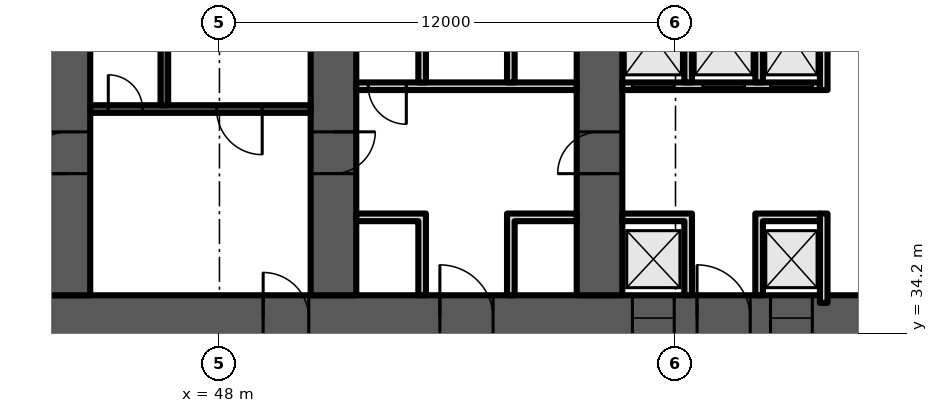
"""IFC4 building model, lengths in metres.
Left out: names, types, materials, properties, quantities, classifications, styles, units other than length and angle.
Written with IfcOpenShell. Run it as: python <this file> out.ifc"""

import sys

from ifc_helpers import new_model, si_unit, direction, frame, frame_2d, origin, place, context, subcontext, project, spatial, polyline, rectangle, outline, extrude, element, fill, save


model = new_model("IFC4")
c1 = context("Model", 3, precision=1e-05, world=origin(), true_north=direction((0.0, 1.0)))
c2 = subcontext(c1, "Body", "Model", "MODEL_VIEW")
j1 = project(units=[si_unit("LENGTHUNIT", "METRE"), si_unit("PLANEANGLEUNIT", "RADIAN")], contexts=[c1])
p1 = place(None, origin())
s1 = spatial("IfcSite", under=j1, at=p1, CompositionType="ELEMENT")
p2 = place(p1, origin())
s2 = spatial("IfcBuilding", under=s1, at=p2, CompositionType="ELEMENT")
p3 = place(p2, frame((0.0, 0.0, 8.0)))
s3 = spatial("IfcBuildingStorey", under=s2, at=p3, CompositionType="ELEMENT", Elevation=8.0)
p4 = place(p3, frame((9.0, 34.6, 0.0), z_axis=(0.0, 0.0, 1.0), x_axis=(1.0, 0.0, 0.0)))
e1 = element("IfcWall", 1, at=p4, inside=s3, PredefinedType="SHEAR", context=c2, shape_type="SweptSolid", body=[
    extrude(rectangle(XDim=56.0, YDim=1.2, at=frame_2d((28.0, 0.0))), origin(), (0.0, 0.0, 1.0), 6.7),
])
p5 = place(p4, frame((2.0, 0.0, 0.0)))
e2 = element("IfcOpeningElement", 2, at=p5, cuts=e1, PredefinedType="OPENING", context=c2, shape_type="SweptSolid", body=[
    extrude(rectangle(XDim=1.0, YDim=2.1, at=frame_2d((0.5, 1.05))), frame((0.0, 0.61, 0.0), z_axis=(0.0, -1.0, 0.0), x_axis=(1.0, 0.0, 0.0)), (0.0, 0.0, 1.0), 1.22),
])
p6 = place(p4, frame((4.6, 0.0, 0.0)))
e3 = element("IfcOpeningElement", 3, at=p6, cuts=e1, PredefinedType="OPENING", context=c2, shape_type="SweptSolid", body=[
    extrude(rectangle(XDim=1.0, YDim=2.1, at=frame_2d((0.5, 1.05))), frame((0.0, 0.61, 0.0), z_axis=(0.0, -1.0, 0.0), x_axis=(1.0, 0.0, 0.0)), (0.0, 0.0, 1.0), 1.22),
])
p7 = place(p4, frame((7.867, 0.0, 0.0)))
e4 = element("IfcOpeningElement", 4, at=p7, cuts=e1, PredefinedType="OPENING", context=c2, shape_type="SweptSolid", body=[
    extrude(rectangle(XDim=1.1, YDim=2.1, at=frame_2d((0.55, 1.05))), frame((0.0, 0.61, 0.0), z_axis=(0.0, -1.0, 0.0), x_axis=(1.0, 0.0, 0.0)), (0.0, 0.0, 1.0), 1.22),
])
p8 = place(p4, frame((12.033, 0.0, 0.0)))
e5 = element("IfcOpeningElement", 5, at=p8, cuts=e1, PredefinedType="OPENING", context=c2, shape_type="SweptSolid", body=[
    extrude(rectangle(XDim=1.1, YDim=2.1, at=frame_2d((0.55, 1.05))), frame((0.0, 0.61, 0.0), z_axis=(0.0, -1.0, 0.0), x_axis=(1.0, 0.0, 0.0)), (0.0, 0.0, 1.0), 1.22),
])
p9 = place(p4, frame((9.8, 0.0, 0.0)))
e6 = element("IfcOpeningElement", 6, at=p9, cuts=e1, PredefinedType="OPENING", context=c2, shape_type="SweptSolid", body=[
    extrude(rectangle(XDim=1.4, YDim=2.1, at=frame_2d((0.7, 1.05))), frame((0.0, 0.61, 0.0), z_axis=(0.0, -1.0, 0.0), x_axis=(1.0, 0.0, 0.0)), (0.0, 0.0, 1.0), 1.22),
])
p10 = place(p4, frame((14.65, 0.0, 0.0)))
e7 = element("IfcOpeningElement", 7, at=p10, cuts=e1, PredefinedType="OPENING", context=c2, shape_type="SweptSolid", body=[
    extrude(rectangle(XDim=1.2, YDim=2.1, at=frame_2d((0.6, 1.05))), frame((0.0, 0.61, 0.0), z_axis=(0.0, -1.0, 0.0), x_axis=(1.0, 0.0, 0.0)), (0.0, 0.0, 1.0), 1.22),
])
p11 = place(p4, frame((21.867, 0.0, 0.0)))
e8 = element("IfcOpeningElement", 8, at=p11, cuts=e1, PredefinedType="OPENING", context=c2, shape_type="SweptSolid", body=[
    extrude(rectangle(XDim=1.1, YDim=2.1, at=frame_2d((0.55, 1.05))), frame((0.0, 0.61, 0.0), z_axis=(0.0, -1.0, 0.0), x_axis=(1.0, 0.0, 0.0)), (0.0, 0.0, 1.0), 1.22),
])
p12 = place(p4, frame((26.033, 0.0, 0.0)))
e9 = element("IfcOpeningElement", 9, at=p12, cuts=e1, PredefinedType="OPENING", context=c2, shape_type="SweptSolid", body=[
    extrude(rectangle(XDim=1.1, YDim=2.1, at=frame_2d((0.55, 1.05))), frame((0.0, 0.61, 0.0), z_axis=(0.0, -1.0, 0.0), x_axis=(1.0, 0.0, 0.0)), (0.0, 0.0, 1.0), 1.22),
])
p13 = place(p4, frame((23.8, 0.0, 0.0)))
e10 = element("IfcOpeningElement", 10, at=p13, cuts=e1, PredefinedType="OPENING", context=c2, shape_type="SweptSolid", body=[
    extrude(rectangle(XDim=1.4, YDim=2.1, at=frame_2d((0.7, 1.05))), frame((0.0, 0.61, 0.0), z_axis=(0.0, -1.0, 0.0), x_axis=(1.0, 0.0, 0.0)), (0.0, 0.0, 1.0), 1.22),
])
p14 = place(p4, frame((28.867, 0.0, 0.0)))
e11 = element("IfcOpeningElement", 11, at=p14, cuts=e1, PredefinedType="OPENING", context=c2, shape_type="SweptSolid", body=[
    extrude(rectangle(XDim=1.1, YDim=2.1, at=frame_2d((0.55, 1.05))), frame((0.0, 0.61, 0.0), z_axis=(0.0, -1.0, 0.0), x_axis=(1.0, 0.0, 0.0)), (0.0, 0.0, 1.0), 1.22),
])
p15 = place(p4, frame((33.033, 0.0, 0.0)))
e12 = element("IfcOpeningElement", 12, at=p15, cuts=e1, PredefinedType="OPENING", context=c2, shape_type="SweptSolid", body=[
    extrude(rectangle(XDim=1.1, YDim=2.1, at=frame_2d((0.55, 1.05))), frame((0.0, 0.61, 0.0), z_axis=(0.0, -1.0, 0.0), x_axis=(1.0, 0.0, 0.0)), (0.0, 0.0, 1.0), 1.22),
])
p16 = place(p4, frame((40.15, 0.0, 0.0)))
e13 = element("IfcOpeningElement", 13, at=p16, cuts=e1, PredefinedType="OPENING", context=c2, shape_type="SweptSolid", body=[
    extrude(rectangle(XDim=1.2, YDim=2.1, at=frame_2d((0.6, 1.05))), frame((0.0, 0.61, 0.0), z_axis=(0.0, -1.0, 0.0), x_axis=(1.0, 0.0, 0.0)), (0.0, 0.0, 1.0), 1.22),
])
p17 = place(p4, frame((44.8, 0.0, 0.0)))
e14 = element("IfcOpeningElement", 14, at=p17, cuts=e1, PredefinedType="OPENING", context=c2, shape_type="SweptSolid", body=[
    extrude(rectangle(XDim=1.4, YDim=2.1, at=frame_2d((0.7, 1.05))), frame((0.0, 0.61, 0.0), z_axis=(0.0, -1.0, 0.0), x_axis=(1.0, 0.0, 0.0)), (0.0, 0.0, 1.0), 1.22),
])
p18 = place(p4, frame((49.867, 0.0, 0.0)))
e15 = element("IfcOpeningElement", 15, at=p18, cuts=e1, PredefinedType="OPENING", context=c2, shape_type="SweptSolid", body=[
    extrude(rectangle(XDim=1.1, YDim=2.1, at=frame_2d((0.55, 1.05))), frame((0.0, 0.61, 0.0), z_axis=(0.0, -1.0, 0.0), x_axis=(1.0, 0.0, 0.0)), (0.0, 0.0, 1.0), 1.22),
])
p19 = place(p4, frame((53.5, 0.0, 0.0)))
e16 = element("IfcOpeningElement", 16, at=p19, cuts=e1, PredefinedType="OPENING", context=c2, shape_type="SweptSolid", body=[
    extrude(rectangle(XDim=1.1, YDim=2.1, at=frame_2d((0.55, 1.05))), frame((0.0, 0.61, 0.0), z_axis=(0.0, -1.0, 0.0), x_axis=(1.0, 0.0, 0.0)), (0.0, 0.0, 1.0), 1.22),
])
p20 = place(p4, frame((51.567, 0.0, 0.0)))
e17 = element("IfcOpeningElement", 17, at=p20, cuts=e1, PredefinedType="OPENING", context=c2, shape_type="SweptSolid", body=[
    extrude(rectangle(XDim=1.4, YDim=2.1, at=frame_2d((0.7, 1.05))), frame((0.0, 0.61, 0.0), z_axis=(0.0, -1.0, 0.0), x_axis=(1.0, 0.0, 0.0)), (0.0, 0.0, 1.0), 1.22),
])
p21 = place(p3, frame((44.0, 35.2, 0.0), z_axis=(0.0, 0.0, 1.0), x_axis=(0.0, 1.0, 0.0)))
e18 = element("IfcWall", 18, at=p21, inside=s3, PredefinedType="SHEAR", context=c2, shape_type="SweptSolid", body=[
    extrude(rectangle(XDim=12.8, YDim=1.2, at=frame_2d((6.4, 0.0))), origin(), (0.0, 0.0, 1.0), 6.7),
])
p22 = place(p21, frame((3.2, 0.0, 0.0)))
e19 = element("IfcOpeningElement", 19, at=p22, cuts=e18, PredefinedType="OPENING", context=c2, shape_type="SweptSolid", body=[
    extrude(rectangle(XDim=1.1, YDim=2.1, at=frame_2d((0.55, 1.05))), frame((0.0, 0.61, 0.0), z_axis=(0.0, -1.0, 0.0), x_axis=(1.0, 0.0, 0.0)), (0.0, 0.0, 1.0), 1.22),
])
p23 = place(p21, frame((9.6, 0.0, 0.0)))
e20 = element("IfcOpeningElement", 20, at=p23, cuts=e18, PredefinedType="OPENING", context=c2, shape_type="SweptSolid", body=[
    extrude(rectangle(XDim=1.0, YDim=2.1, at=frame_2d((0.5, 1.05))), frame((0.0, 0.61, 0.0), z_axis=(0.0, -1.0, 0.0), x_axis=(1.0, 0.0, 0.0)), (0.0, 0.0, 1.0), 1.22),
])
p24 = place(p3, frame((51.0, 35.2, 0.0), z_axis=(0.0, 0.0, 1.0), x_axis=(0.0, 1.0, 0.0)))
e21 = element("IfcWall", 21, at=p24, inside=s3, PredefinedType="SHEAR", context=c2, shape_type="SweptSolid", body=[
    extrude(rectangle(XDim=12.8, YDim=1.2, at=frame_2d((6.4, 0.0))), origin(), (0.0, 0.0, 1.0), 6.7),
])
p25 = place(p24, frame((3.2, 0.0, 0.0)))
e22 = element("IfcOpeningElement", 22, at=p25, cuts=e21, PredefinedType="OPENING", context=c2, shape_type="SweptSolid", body=[
    extrude(rectangle(XDim=1.1, YDim=2.1, at=frame_2d((0.55, 1.05))), frame((0.0, 0.61, 0.0), z_axis=(0.0, -1.0, 0.0), x_axis=(1.0, 0.0, 0.0)), (0.0, 0.0, 1.0), 1.22),
])
p26 = place(p3, frame((58.0, 35.2, 0.0), z_axis=(0.0, 0.0, 1.0), x_axis=(0.0, 1.0, 0.0)))
e23 = element("IfcWall", 23, at=p26, inside=s3, PredefinedType="SHEAR", context=c2, shape_type="SweptSolid", body=[
    extrude(rectangle(XDim=12.8, YDim=1.2, at=frame_2d((6.4, 0.0))), origin(), (0.0, 0.0, 1.0), 6.7),
])
p27 = place(p26, frame((10.134, 0.0, 0.0)))
e24 = element("IfcOpeningElement", 24, at=p27, cuts=e23, PredefinedType="OPENING", context=c2, shape_type="SweptSolid", body=[
    extrude(rectangle(XDim=1.0, YDim=2.1, at=frame_2d((0.5, 1.05))), frame((0.0, 0.61, 0.0), z_axis=(0.0, -1.0, 0.0), x_axis=(1.0, 0.0, 0.0)), (0.0, 0.0, 1.0), 1.22),
])
p28 = place(p26, frame((3.2, 0.0, 0.0)))
e25 = element("IfcOpeningElement", 25, at=p28, cuts=e23, PredefinedType="OPENING", context=c2, shape_type="SweptSolid", body=[
    extrude(rectangle(XDim=1.1, YDim=2.1, at=frame_2d((0.55, 1.05))), frame((0.0, 0.61, 0.0), z_axis=(0.0, -1.0, 0.0), x_axis=(1.0, 0.0, 0.0)), (0.0, 0.0, 1.0), 1.22),
])
p29 = place(p3, frame((44.6, 40.1, 0.0), z_axis=(0.0, 0.0, 1.0), x_axis=(1.0, 0.0, 0.0)))
e26 = element("IfcWall", 26, at=p29, inside=s3, PredefinedType="SHEAR", context=c2, shape_type="SweptSolid", body=[
    extrude(rectangle(XDim=5.8, YDim=0.2, at=frame_2d((2.9, 0.0))), origin(), (0.0, 0.0, 1.0), 6.7),
])
p30 = place(p29, frame((3.325, 0.0, 0.0)))
e27 = element("IfcOpeningElement", 27, at=p30, cuts=e26, PredefinedType="OPENING", context=c2, shape_type="SweptSolid", body=[
    extrude(rectangle(XDim=1.2, YDim=2.1, at=frame_2d((0.6, 1.05))), frame((0.0, 0.11, 0.0), z_axis=(0.0, -1.0, 0.0), x_axis=(1.0, 0.0, 0.0)), (0.0, 0.0, 1.0), 0.22),
])
p31 = place(p29, frame((0.475, 0.0, 0.0)))
e28 = element("IfcOpeningElement", 28, at=p31, cuts=e26, PredefinedType="OPENING", context=c2, shape_type="SweptSolid", body=[
    extrude(rectangle(XDim=0.9, YDim=2.1, at=frame_2d((0.45, 1.05))), frame((0.0, 0.11, 0.0), z_axis=(0.0, -1.0, 0.0), x_axis=(1.0, 0.0, 0.0)), (0.0, 0.0, 1.0), 0.22),
])
p32 = place(p3, frame((46.55, 40.2, 0.0), z_axis=(0.0, 0.0, 1.0), x_axis=(0.0, 1.0, 0.0)))
e29 = element("IfcWall", 29, at=p32, inside=s3, PredefinedType="SHEAR", context=c2, shape_type="SweptSolid", body=[
    extrude(rectangle(XDim=7.2, YDim=0.2, at=frame_2d((3.6, 0.0))), origin(), (0.0, 0.0, 1.0), 6.7),
])
p33 = place(p3, frame((51.6, 40.7, 0.0), z_axis=(0.0, 0.0, 1.0), x_axis=(1.0, 0.0, 0.0)))
e30 = element("IfcWall", 30, at=p33, inside=s3, PredefinedType="PARTITIONING", context=c2, shape_type="SweptSolid", body=[
    extrude(rectangle(XDim=5.8, YDim=0.2, at=frame_2d((2.9, 0.0))), origin(), (0.0, 0.0, 1.0), 6.7),
])
p34 = place(p33, frame((0.317, 0.0, 0.0)))
e31 = element("IfcOpeningElement", 31, at=p34, cuts=e30, PredefinedType="OPENING", context=c2, shape_type="SweptSolid", body=[
    extrude(rectangle(XDim=1.0, YDim=2.1, at=frame_2d((0.5, 1.05))), frame((0.0, 0.11, 0.0), z_axis=(0.0, -1.0, 0.0), x_axis=(1.0, 0.0, 0.0)), (0.0, 0.0, 1.0), 0.22),
])
p35 = place(p3, frame((0.0, 0.0, -0.0)))
e32 = element("IfcWall", 32, at=p35, inside=s3, PredefinedType="PARTITIONING", context=c2, shape_type="SweptSolid", body=[
    extrude(outline(polyline([(53.233, 37.15), (51.6, 37.15), (51.6, 37.35), (53.233, 37.35), (53.433, 37.35), (53.433, 35.2), (53.233, 35.2), (53.233, 37.15)])), origin(), (0.0, 0.0, 1.0), 6.7),
])
p36 = place(p3, frame((0.0, 0.0, -0.0)))
e33 = element("IfcWall", 33, at=p36, inside=s3, PredefinedType="PARTITIONING", context=c2, shape_type="SweptSolid", body=[
    extrude(outline(polyline([(55.567, 37.35), (55.767, 37.35), (57.4, 37.35), (57.4, 37.15), (55.767, 37.15), (55.767, 35.2), (55.567, 35.2), (55.567, 37.35)])), origin(), (0.0, 0.0, 1.0), 6.7),
])
p37 = place(p3, frame((0.0, 0.0, -0.0)))
e34 = element("IfcWall", 34, at=p37, inside=s3, PredefinedType="PARTITIONING", context=c2, shape_type="SweptSolid", body=[
    extrude(outline(polyline([(53.233, 40.8), (53.233, 43.8), (53.433, 43.8), (53.433, 40.8), (53.233, 40.8)])), origin(), (0.0, 0.0, 1.0), 6.7),
])
p38 = place(p3, frame((0.0, 0.0, -0.0)))
e35 = element("IfcWall", 35, at=p38, inside=s3, PredefinedType="PARTITIONING", context=c2, shape_type="SweptSolid", body=[
    extrude(outline(polyline([(55.567, 40.8), (55.567, 43.8), (55.767, 43.8), (55.767, 40.8), (55.567, 40.8)])), origin(), (0.0, 0.0, 1.0), 6.7),
])
p39 = place(p3, frame((58.6, 40.7, 0.0), z_axis=(0.0, 0.0, 1.0), x_axis=(1.0, 0.0, 0.0)))
e36 = element("IfcWall", 36, at=p39, inside=s3, PredefinedType="PARTITIONING", context=c2, shape_type="SweptSolid", body=[
    extrude(rectangle(XDim=5.2, YDim=0.2, at=frame_2d((2.6, 0.0))), origin(), (0.0, 0.0, 1.0), 6.7),
])
p40 = place(p39, frame((0.267, 0.0, 0.0)))
e37 = element("IfcOpeningElement", 37, at=p40, cuts=e36, PredefinedType="OPENING", context=c2, shape_type="SweptSolid", body=[
    extrude(rectangle(XDim=1.1, YDim=2.1, at=frame_2d((0.55, 1.05))), frame((0.0, 0.11, 0.0), z_axis=(0.0, -1.0, 0.0), x_axis=(1.0, 0.0, 0.0)), (0.0, 0.0, 1.0), 0.22),
])
p41 = place(p39, frame((2.117, 0.0, 0.0)))
e38 = element("IfcOpeningElement", 38, at=p41, cuts=e36, PredefinedType="OPENING", context=c2, shape_type="SweptSolid", body=[
    extrude(rectangle(XDim=1.1, YDim=2.1, at=frame_2d((0.55, 1.05))), frame((0.0, 0.11, 0.0), z_axis=(0.0, -1.0, 0.0), x_axis=(1.0, 0.0, 0.0)), (0.0, 0.0, 1.0), 0.22),
])
p42 = place(p39, frame((3.9, 0.0, 0.0)))
e39 = element("IfcOpeningElement", 39, at=p42, cuts=e36, PredefinedType="OPENING", context=c2, shape_type="SweptSolid", body=[
    extrude(rectangle(XDim=1.1, YDim=2.1, at=frame_2d((0.55, 1.05))), frame((0.0, 0.11, 0.0), z_axis=(0.0, -1.0, 0.0), x_axis=(1.0, 0.0, 0.0)), (0.0, 0.0, 1.0), 0.22),
])
p43 = place(p3, frame((0.0, 0.0, -0.0)))
e40 = element("IfcWall", 40, at=p43, inside=s3, PredefinedType="PARTITIONING", context=c2, shape_type="SweptSolid", body=[
    extrude(outline(polyline([(60.233, 37.15), (58.6, 37.15), (58.6, 37.35), (60.233, 37.35), (60.433, 37.35), (60.433, 35.2), (60.233, 35.2), (60.233, 37.15)])), origin(), (0.0, 0.0, 1.0), 6.7),
])
p44 = place(p3, frame((0.0, 0.0, -0.0)))
e41 = element("IfcWall", 41, at=p44, inside=s3, PredefinedType="PARTITIONING", context=c2, shape_type="SweptSolid", body=[
    extrude(outline(polyline([(62.1, 37.35), (62.3, 37.35), (63.8, 37.35), (63.8, 37.15), (62.3, 37.15), (62.3, 35.2), (62.1, 35.2), (62.1, 37.35)])), origin(), (0.0, 0.0, 1.0), 6.7),
])
p45 = place(p3, frame((0.0, 0.0, -0.0)))
e42 = element("IfcWall", 42, at=p45, inside=s3, PredefinedType="PARTITIONING", context=c2, shape_type="SweptSolid", body=[
    extrude(outline(polyline([(60.433, 40.8), (60.233, 40.8), (60.233, 43.8), (58.6, 43.8), (58.6, 44.0), (63.8, 44.0), (63.8, 43.8), (62.3, 43.8), (62.3, 40.8), (62.1, 40.8), (62.1, 43.8), (60.433, 43.8), (60.433, 40.8)])), origin(), (0.0, 0.0, 1.0), 6.7),
])
p46 = place(p3, frame((63.9, 35.0, 0.0), z_axis=(0.0, 0.0, 1.0), x_axis=(0.0, 1.0, 0.0)))
e43 = element("IfcWall", 43, at=p46, inside=s3, PredefinedType="PARTITIONING", context=c2, shape_type="SweptSolid", body=[
    extrude(rectangle(XDim=2.35, YDim=0.2, at=frame_2d((1.175, 0.0))), origin(), (0.0, 0.0, 1.0), 6.7),
])
p47 = place(p3, frame((63.9, 40.6, 0.0), z_axis=(0.0, 0.0, 1.0), x_axis=(0.0, 1.0, 0.0)))
e44 = element("IfcWall", 44, at=p47, inside=s3, PredefinedType="PARTITIONING", context=c2, shape_type="SweptSolid", body=[
    extrude(rectangle(XDim=3.4, YDim=0.2, at=frame_2d((1.7, 0.0))), origin(), (0.0, 0.0, 1.0), 6.7),
])
p48 = place(p30, origin())
e45 = element("IfcDoor", 45, at=p48, inside=s3, OperationType="SINGLE_SWING_RIGHT", PredefinedType="DOOR", context=c2, shape_type="SweptSolid", body=[
    extrude(rectangle(XDim=1.2, YDim=2.1, at=frame_2d((0.6, 1.05))), frame((0.0, 0.025, 0.0), z_axis=(0.0, -1.0, 0.0), x_axis=(1.0, 0.0, 0.0)), (0.0, 0.0, 1.0), 0.05),
])
fill(e27, e45)
p49 = place(p31, origin())
e46 = element("IfcDoor", 46, at=p49, inside=s3, OperationType="SINGLE_SWING_LEFT", PredefinedType="DOOR", context=c2, shape_type="SweptSolid", body=[
    extrude(rectangle(XDim=0.9, YDim=2.1, at=frame_2d((0.45, 1.05))), frame((0.0, 0.025, 0.0), z_axis=(0.0, -1.0, 0.0), x_axis=(1.0, 0.0, 0.0)), (0.0, 0.0, 1.0), 0.05),
])
fill(e28, e46)
p50 = place(p16, origin())
e47 = element("IfcDoor", 47, at=p50, inside=s3, OperationType="SINGLE_SWING_LEFT", PredefinedType="DOOR", context=c2, shape_type="SweptSolid", body=[
    extrude(rectangle(XDim=1.2, YDim=2.1, at=frame_2d((0.6, 1.05))), frame((0.0, 0.025, 0.0), z_axis=(0.0, -1.0, 0.0), x_axis=(1.0, 0.0, 0.0)), (0.0, 0.0, 1.0), 0.05),
])
fill(e13, e47)
p51 = place(p17, origin())
e48 = element("IfcDoor", 48, at=p51, inside=s3, OperationType="DOUBLE_DOOR_SINGLE_SWING", PredefinedType="DOOR", context=c2, shape_type="SweptSolid", body=[
    extrude(rectangle(XDim=1.4, YDim=2.1, at=frame_2d((0.7, 1.05))), frame((0.0, 0.025, 0.0), z_axis=(0.0, -1.0, 0.0), x_axis=(1.0, 0.0, 0.0)), (0.0, 0.0, 1.0), 0.05),
])
fill(e14, e48)
p52 = place(p34, origin())
e49 = element("IfcDoor", 49, at=p52, inside=s3, OperationType="SINGLE_SWING_RIGHT", PredefinedType="DOOR", context=c2, shape_type="SweptSolid", body=[
    extrude(rectangle(XDim=1.0, YDim=2.1, at=frame_2d((0.5, 1.05))), frame((0.0, 0.025, 0.0), z_axis=(0.0, -1.0, 0.0), x_axis=(1.0, 0.0, 0.0)), (0.0, 0.0, 1.0), 0.05),
])
fill(e31, e49)
p53 = place(p18, origin())
e50 = element("IfcDoor", 50, at=p53, inside=s3, OperationType="DOUBLE_DOOR_SLIDING", PredefinedType="DOOR", context=c2, shape_type="SweptSolid", body=[
    extrude(rectangle(XDim=1.1, YDim=2.1, at=frame_2d((0.55, 1.05))), frame((0.0, 0.025, 0.0), z_axis=(0.0, -1.0, 0.0), x_axis=(1.0, 0.0, 0.0)), (0.0, 0.0, 1.0), 0.05),
])
fill(e15, e50)
p54 = place(p19, origin())
e51 = element("IfcDoor", 51, at=p54, inside=s3, OperationType="DOUBLE_DOOR_SLIDING", PredefinedType="DOOR", context=c2, shape_type="SweptSolid", body=[
    extrude(rectangle(XDim=1.1, YDim=2.1, at=frame_2d((0.55, 1.05))), frame((0.0, 0.025, 0.0), z_axis=(0.0, -1.0, 0.0), x_axis=(1.0, 0.0, 0.0)), (0.0, 0.0, 1.0), 0.05),
])
fill(e16, e51)
p55 = place(p20, origin())
e52 = element("IfcDoor", 52, at=p55, inside=s3, OperationType="DOUBLE_DOOR_SINGLE_SWING", PredefinedType="DOOR", context=c2, shape_type="SweptSolid", body=[
    extrude(rectangle(XDim=1.4, YDim=2.1, at=frame_2d((0.7, 1.05))), frame((0.0, 0.025, 0.0), z_axis=(0.0, -1.0, 0.0), x_axis=(1.0, 0.0, 0.0)), (0.0, 0.0, 1.0), 0.05),
])
fill(e17, e52)
p56 = place(p40, origin())
e53 = element("IfcDoor", 53, at=p56, inside=s3, OperationType="DOUBLE_DOOR_SLIDING", PredefinedType="DOOR", context=c2, shape_type="SweptSolid", body=[
    extrude(rectangle(XDim=1.1, YDim=2.1, at=frame_2d((0.55, 1.05))), frame((0.0, 0.025, 0.0), z_axis=(0.0, -1.0, 0.0), x_axis=(1.0, 0.0, 0.0)), (0.0, 0.0, 1.0), 0.05),
])
fill(e37, e53)
p57 = place(p41, origin())
e54 = element("IfcDoor", 54, at=p57, inside=s3, OperationType="DOUBLE_DOOR_SLIDING", PredefinedType="DOOR", context=c2, shape_type="SweptSolid", body=[
    extrude(rectangle(XDim=1.1, YDim=2.1, at=frame_2d((0.55, 1.05))), frame((0.0, 0.025, 0.0), z_axis=(0.0, -1.0, 0.0), x_axis=(1.0, 0.0, 0.0)), (0.0, 0.0, 1.0), 0.05),
])
fill(e38, e54)
p58 = place(p42, origin())
e55 = element("IfcDoor", 55, at=p58, inside=s3, OperationType="DOUBLE_DOOR_SLIDING", PredefinedType="DOOR", context=c2, shape_type="SweptSolid", body=[
    extrude(rectangle(XDim=1.1, YDim=2.1, at=frame_2d((0.55, 1.05))), frame((0.0, 0.025, 0.0), z_axis=(0.0, -1.0, 0.0), x_axis=(1.0, 0.0, 0.0)), (0.0, 0.0, 1.0), 0.05),
])
fill(e39, e55)
p59 = place(p22, origin())
e56 = element("IfcDoor", 56, at=p59, inside=s3, OperationType="SINGLE_SWING_LEFT", PredefinedType="DOOR", context=c2, shape_type="SweptSolid", body=[
    extrude(rectangle(XDim=1.1, YDim=2.1, at=frame_2d((0.55, 1.05))), frame((0.0, 0.025, 0.0), z_axis=(0.0, -1.0, 0.0), x_axis=(1.0, 0.0, 0.0)), (0.0, 0.0, 1.0), 0.05),
])
fill(e19, e56)
p60 = place(p25, origin())
e57 = element("IfcDoor", 57, at=p60, inside=s3, OperationType="SINGLE_SWING_RIGHT", PredefinedType="DOOR", context=c2, shape_type="SweptSolid", body=[
    extrude(rectangle(XDim=1.1, YDim=2.1, at=frame_2d((0.55, 1.05))), frame((0.0, 0.025, 0.0), z_axis=(0.0, -1.0, 0.0), x_axis=(1.0, 0.0, 0.0)), (0.0, 0.0, 1.0), 0.05),
])
fill(e22, e57)
p61 = place(p28, origin())
e58 = element("IfcDoor", 58, at=p61, inside=s3, OperationType="SINGLE_SWING_LEFT", PredefinedType="DOOR", context=c2, shape_type="SweptSolid", body=[
    extrude(rectangle(XDim=1.1, YDim=2.1, at=frame_2d((0.55, 1.05))), frame((0.0, 0.025, 0.0), z_axis=(0.0, -1.0, 0.0), x_axis=(1.0, 0.0, 0.0)), (0.0, 0.0, 1.0), 0.05),
])
fill(e25, e58)
save(model, sys.argv[1])
